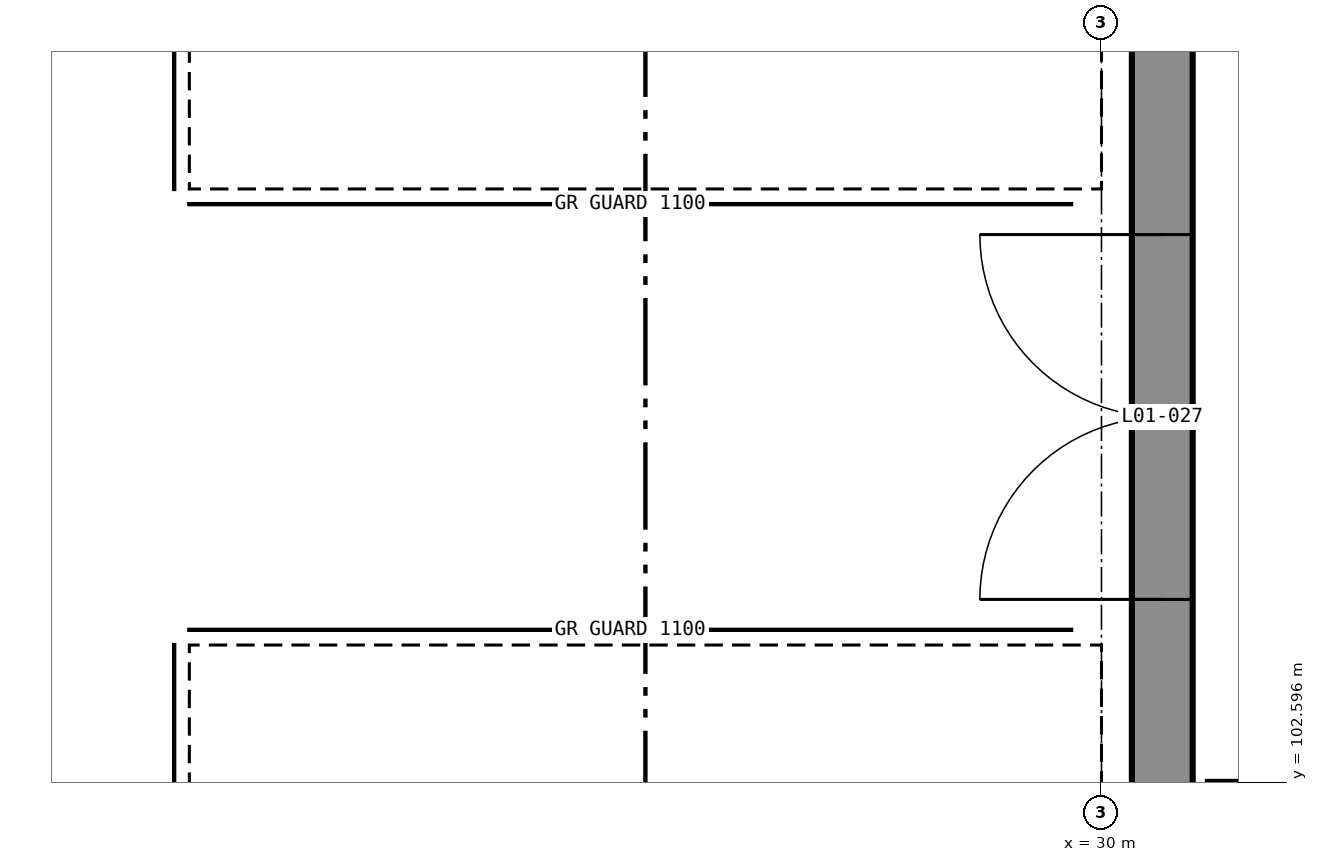
"""IFC4 building model, lengths in metres.
Left out: names, types, materials, properties, quantities, classifications, styles, units other than length and angle.
Written with IfcOpenShell. Run it as: python <this file> out.ifc"""

import sys

from ifc_helpers import new_model, si_unit, direction, frame, frame_2d, origin, place, context, subcontext, project, spatial, rectangle, extrude, element, fill, save


model = new_model("IFC4")
c1 = context("Model", 3, precision=1e-05, world=origin(), true_north=direction((0.0, 1.0)))
c2 = subcontext(c1, "Body", "Model", "MODEL_VIEW")
j1 = project(units=[si_unit("LENGTHUNIT", "METRE"), si_unit("PLANEANGLEUNIT", "RADIAN")], contexts=[c1])
p1 = place(None, origin())
s1 = spatial("IfcSite", under=j1, at=p1, CompositionType="ELEMENT")
p2 = place(p1, origin())
s2 = spatial("IfcBuilding", under=s1, at=p2, CompositionType="ELEMENT")
p3 = place(p2, frame((0.0, 0.0, 6.0)))
s3 = spatial("IfcBuildingStorey", under=s2, at=p3, CompositionType="ELEMENT", Elevation=6.0)
p4 = place(p3, frame((30.4, 102.5, 0.0), z_axis=(0.0, 0.0, 1.0), x_axis=(0.0, 1.0, 0.0)))
e1 = element("IfcWall", 1, at=p4, inside=s3, PredefinedType="SOLIDWALL", context=c2, shape_type="SweptSolid", body=[
    extrude(rectangle(XDim=11.0, YDim=0.4, at=frame_2d((5.5, 0.0))), origin(), (0.0, 0.0, 1.0), 6.0),
])
p5 = place(p4, frame((1.3, 0.0, 0.0)))
e2 = element("IfcOpeningElement", 2, at=p5, cuts=e1, PredefinedType="OPENING", context=c2, shape_type="SweptSolid", body=[
    extrude(rectangle(XDim=2.4, YDim=2.4, at=frame_2d((1.2, 1.2))), frame((0.0, 0.21, 0.0), z_axis=(0.0, -1.0, 0.0), x_axis=(1.0, 0.0, 0.0)), (0.0, 0.0, 1.0), 0.42),
])
p6 = place(p5, origin())
e3 = element("IfcDoor", 3, at=p6, inside=s3, OperationType="DOUBLE_DOOR_SINGLE_SWING", PredefinedType="DOOR", context=c2, shape_type="SweptSolid", body=[
    extrude(rectangle(XDim=2.4, YDim=2.4, at=frame_2d((1.2, 1.2))), frame((0.0, 0.025, 0.0), z_axis=(0.0, -1.0, 0.0), x_axis=(1.0, 0.0, 0.0)), (0.0, 0.0, 1.0), 0.05),
])
fill(e2, e3)
save(model, sys.argv[1])
